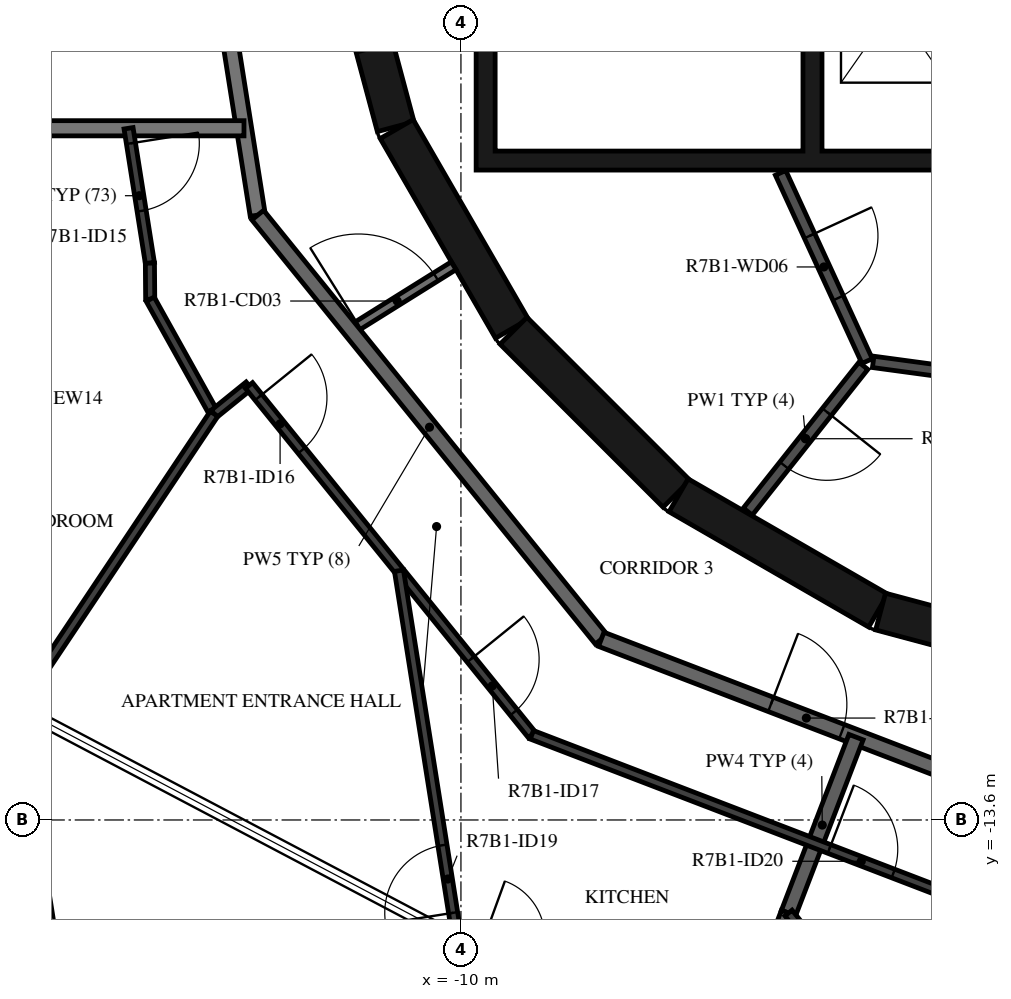
"""IFC4 building model, lengths in metres.
Left out: names, types, materials, properties, quantities, classifications, styles, units other than length and angle.
Written with IfcOpenShell. Run it as: python <this file> out.ifc"""

import sys

from ifc_helpers import new_model, si_unit, direction, frame, frame_2d, origin, place, context, subcontext, project, spatial, polyline, rectangle, outline, extrude, element, fill, save


model = new_model("IFC4")
c1 = context("Model", 3, precision=1e-05, world=origin(), true_north=direction((0.0, 1.0)))
c2 = subcontext(c1, "Body", "Model", "MODEL_VIEW")
j1 = project(units=[si_unit("LENGTHUNIT", "METRE"), si_unit("PLANEANGLEUNIT", "RADIAN")], contexts=[c1])
p1 = place(None, origin())
s1 = spatial("IfcSite", under=j1, at=p1, CompositionType="ELEMENT")
p2 = place(p1, origin())
s2 = spatial("IfcBuilding", under=s1, at=p2, CompositionType="ELEMENT")
p3 = place(p2, frame((0.0, 0.0, 273.9)))
s3 = spatial("IfcBuildingStorey", under=s2, at=p3, CompositionType="ELEMENT", Elevation=273.9)
p4 = place(p3, frame((-11.643, -1.55, 0.0), z_axis=(0.0, 0.0, 1.0), x_axis=(0.258734743916, -0.965948410781, 0.0)))
e1 = element("IfcWall", 1, at=p4, inside=s3, PredefinedType="SHEAR", context=c2, shape_type="SweptSolid", body=[
    extrude(rectangle(XDim=3.033, YDim=0.5, at=frame_2d((1.516, 0.0))), origin(), (0.0, 0.0, 1.0), 3.12),
])
p5 = place(p4, frame((1.066, 0.0, 0.0)))
e2 = element("IfcOpeningElement", 2, at=p5, cuts=e1, PredefinedType="OPENING", context=c2, shape_type="SweptSolid", body=[
    extrude(rectangle(XDim=0.9, YDim=2.1, at=frame_2d((0.45, 1.05))), frame((0.0, 0.26, 0.0), z_axis=(0.0, -1.0, 0.0), x_axis=(1.0, 0.0, 0.0)), (0.0, 0.0, 1.0), 0.52),
])
p6 = place(p3, frame((-10.845, -4.51, 0.0), z_axis=(0.0, 0.0, 1.0), x_axis=(0.500087131594, -0.865975092491, 0.0)))
e3 = element("IfcWall", 3, at=p6, inside=s3, PredefinedType="SHEAR", context=c2, shape_type="SweptSolid", body=[
    extrude(rectangle(XDim=3.033, YDim=0.5, at=frame_2d((1.516, 0.0))), origin(), (0.0, 0.0, 1.0), 3.12),
])
p7 = place(p3, frame((-9.308, -7.164, 0.0), z_axis=(0.0, 0.0, 1.0), x_axis=(0.707106781187, -0.707106781187, 0.0)))
e4 = element("IfcWall", 4, at=p7, inside=s3, PredefinedType="SHEAR", context=c2, shape_type="SweptSolid", body=[
    extrude(rectangle(XDim=3.032, YDim=0.5, at=frame_2d((1.516, 0.0))), origin(), (0.0, 0.0, 1.0), 3.12),
])
for number, where, z_axis, x_axis in (
    (5, (-7.137, -9.329, 0.0), (0.0, 0.0, 1.0), (0.866, -0.5, 0.0)),
    (6, (-4.479, -10.858, 0.0), (0.0, 0.0, 1.0), (0.966, -0.259, 0.0)),
):
    element("IfcWall", number, at=place(p3, frame(where, z_axis=z_axis, x_axis=x_axis)), inside=s3, PredefinedType="SHEAR", context=c2, shape_type="SweptSolid", body=[
        extrude(rectangle(XDim=3.033, YDim=0.5, at=frame_2d((1.516, 0.0))), origin(), (0.0, 0.0, 1.0), 3.12),
    ])
p8 = place(p3, origin())
e7 = element("IfcWall", 7, at=p8, inside=s3, PredefinedType="SHEAR", context=c2, shape_type="SweptSolid", body=[
    extrude(outline(polyline([(9.8, -5.05), (9.8, -4.8), (9.8, -1.9), (9.55, -1.9), (9.55, -4.8), (7.65, -4.8), (7.65, -1.9), (7.4, -1.9), (7.4, -4.8), (5.5, -4.8), (5.5, -1.9), (5.25, -1.9), (5.25, -4.8), (3.35, -4.8), (3.35, -1.9), (3.1, -1.9), (3.1, -4.8), (1.2, -4.8), (1.2, -1.9), (0.95, -1.9), (0.95, -4.8), (-0.95, -4.8), (-0.95, -1.9), (-1.2, -1.9), (-1.2, -4.8), (-3.1, -4.8), (-3.1, -1.9), (-3.35, -1.9), (-3.35, -4.8), (-5.25, -4.8), (-5.25, -1.9), (-5.5, -1.9), (-5.5, -4.8), (-9.55, -4.8), (-9.55, -1.9), (-9.8, -1.9), (-9.8, -4.8), (-9.8, -5.05), (9.8, -5.05)])), origin(), (0.0, 0.0, 1.0), 3.12),
])
p9 = place(p3, frame((-5.795, -5.086, 0.0), z_axis=(0.0, 0.0, 1.0), x_axis=(0.417887867606, -0.908498613157, 0.0)))
e8 = element("IfcWall", 8, at=p9, inside=s3, PredefinedType="PARTITIONING", context=c2, shape_type="SweptSolid", body=[
    extrude(rectangle(XDim=2.726, YDim=0.15, at=frame_2d((1.363, 0.0))), origin(), (0.0, 0.0, 1.0), 3.12),
])
p10 = place(p9, frame((0.913, 0.0, 0.0)))
e9 = element("IfcOpeningElement", 9, at=p10, cuts=e8, PredefinedType="OPENING", context=c2, shape_type="SweptSolid", body=[
    extrude(rectangle(XDim=0.9, YDim=2.1, at=frame_2d((0.45, 1.05))), frame((0.0, 0.085, 0.0), z_axis=(0.0, -1.0, 0.0), x_axis=(1.0, 0.0, 0.0)), (0.0, 0.0, 1.0), 0.17),
])
p11 = place(p3, frame((-4.706, -7.625, 0.0), z_axis=(0.0, 0.0, 1.0), x_axis=(-0.621392599334, -0.783499353856, 0.0)))
e10 = element("IfcWall", 10, at=p11, inside=s3, PredefinedType="PARTITIONING", context=c2, shape_type="SweptSolid", body=[
    extrude(rectangle(XDim=2.447, YDim=0.15, at=frame_2d((1.224, 0.0))), origin(), (0.0, 0.0, 1.0), 3.12),
])
p12 = place(p11, frame((0.774, 0.0, 0.0)))
e11 = element("IfcOpeningElement", 11, at=p12, cuts=e10, PredefinedType="OPENING", context=c2, shape_type="SweptSolid", body=[
    extrude(rectangle(XDim=0.9, YDim=2.1, at=frame_2d((0.45, 1.05))), frame((0.0, 0.085, 0.0), z_axis=(0.0, -1.0, 0.0), x_axis=(1.0, 0.0, 0.0)), (0.0, 0.0, 1.0), 0.17),
])
p13 = place(p3, frame((-2.42, -7.865, 0.0), z_axis=(0.0, 0.0, 1.0), x_axis=(-0.990972299108, 0.134066783362, 0.0)))
e12 = element("IfcWall", 12, at=p13, inside=s3, PredefinedType="PARTITIONING", context=c2, shape_type="SweptSolid", body=[
    extrude(rectangle(XDim=2.176, YDim=0.15, at=frame_2d((1.088, 0.0))), origin(), (0.0, 0.0, 1.0), 3.12),
])
p14 = place(p3, frame((-11.449, -7.154, 0.0), z_axis=(0.0, 0.0, 1.0), x_axis=(0.848067047543, 0.529888934468, 0.0)))
e13 = element("IfcWall", 13, at=p14, inside=s3, PredefinedType="PARTITIONING", context=c2, shape_type="SweptSolid", body=[
    extrude(rectangle(XDim=1.596, YDim=0.12, at=frame_2d((0.798, 0.0))), origin(), (0.0, 0.0, 1.0), 3.12),
])
p15 = place(p14, frame((0.12, 0.0, 0.0)))
e14 = element("IfcOpeningElement", 14, at=p15, cuts=e13, PredefinedType="OPENING", context=c2, shape_type="SweptSolid", body=[
    extrude(rectangle(XDim=1.2, YDim=2.1, at=frame_2d((0.6, 1.05))), frame((0.0, 0.07, 0.0), z_axis=(0.0, -1.0, 0.0), x_axis=(1.0, 0.0, 0.0)), (0.0, 0.0, 1.0), 0.14),
])
p16 = place(p3, frame((-13.797, 1.45, 0.0), z_axis=(0.0, 0.0, 1.0), x_axis=(0.156421704315, -0.987690361611, 0.0)))
e15 = element("IfcWall", 15, at=p16, inside=s3, PredefinedType="STANDARD", context=c2, shape_type="SweptSolid", body=[
    extrude(rectangle(XDim=7.181, YDim=0.2, at=frame_2d((3.591, 0.0))), origin(), (0.0, 0.0, 1.0), 3.12),
])
p17 = place(p3, frame((-12.673, -5.643, 0.0), z_axis=(0.0, 0.0, 1.0), x_axis=(0.629302871585, -0.777160148113, 0.0)))
e16 = element("IfcWall", 16, at=p17, inside=s3, PredefinedType="STANDARD", context=c2, shape_type="SweptSolid", body=[
    extrude(rectangle(XDim=7.181, YDim=0.2, at=frame_2d((3.59, 0.0))), origin(), (0.0, 0.0, 1.0), 3.12),
])
p18 = place(p3, frame((-8.154, -11.223, 0.0), z_axis=(0.0, 0.0, 1.0), x_axis=(0.93359073609, -0.358341090983, 0.0)))
e17 = element("IfcWall", 17, at=p18, inside=s3, PredefinedType="STANDARD", context=c2, shape_type="SweptSolid", body=[
    extrude(rectangle(XDim=7.181, YDim=0.2, at=frame_2d((3.59, 0.0))), origin(), (0.0, 0.0, 1.0), 3.12),
])
p19 = place(p18, frame((2.39, 0.0, 0.0)))
e18 = element("IfcOpeningElement", 18, at=p19, cuts=e17, PredefinedType="OPENING", context=c2, shape_type="SweptSolid", body=[
    extrude(rectangle(XDim=1.0, YDim=2.1, at=frame_2d((0.5, 1.05))), frame((0.0, 0.11, 0.0), z_axis=(0.0, -1.0, 0.0), x_axis=(1.0, 0.0, 0.0)), (0.0, 0.0, 1.0), 0.22),
])
p20 = place(p3, frame((-17.002, -4.5, 0.0), z_axis=(0.0, 0.0, 1.0), x_axis=(1.0, 0.0, 0.0)))
e19 = element("IfcWall", 19, at=p20, inside=s3, PredefinedType="STANDARD", context=c2, shape_type="SweptSolid", body=[
    extrude(rectangle(XDim=4.148, YDim=0.2, at=frame_2d((2.074, 0.0))), origin(), (0.0, 0.0, 1.0), 3.12),
])
p21 = place(p3, frame((-5.69, -14.824, 0.0), z_axis=(0.0, 0.0, 1.0), x_axis=(0.358345342952, 0.933589104041, 0.0)))
e20 = element("IfcWall", 20, at=p21, inside=s3, PredefinedType="STANDARD", context=c2, shape_type="SweptSolid", body=[
    extrude(rectangle(XDim=2.479, YDim=0.2, at=frame_2d((1.239, 0.0))), origin(), (0.0, 0.0, 1.0), 3.12),
])
p22 = place(p3, frame((-6.25, -16.282, 0.0), z_axis=(0.0, 0.0, 1.0), x_axis=(0.358360842469, 0.933583154617, 0.0)))
e21 = element("IfcWall", 21, at=p22, inside=s3, PredefinedType="STANDARD", context=c2, shape_type="SweptSolid", body=[
    extrude(rectangle(XDim=1.562, YDim=0.2, at=frame_2d((0.781, 0.0))), origin(), (0.0, 0.0, 1.0), 3.12),
])
p23 = place(p3, frame((-14.373, -4.5, 0.0), z_axis=(0.0, 0.0, 1.0), x_axis=(0.156437152886, -0.987687914878, 0.0)))
e22 = element("IfcWall", 22, at=p23, inside=s3, PredefinedType="PARTITIONING", context=c2, shape_type="SweptSolid", body=[
    extrude(rectangle(XDim=1.796, YDim=0.12, at=frame_2d((0.898, 0.0))), origin(), (0.0, 0.0, 1.0), 3.12),
])
p24 = place(p23, frame((0.2, 0.0, 0.0)))
e23 = element("IfcOpeningElement", 23, at=p24, cuts=e22, PredefinedType="OPENING", context=c2, shape_type="SweptSolid", body=[
    extrude(rectangle(XDim=0.9, YDim=2.1, at=frame_2d((0.45, 1.05))), frame((0.0, 0.07, 0.0), z_axis=(0.0, -1.0, 0.0), x_axis=(1.0, 0.0, 0.0)), (0.0, 0.0, 1.0), 0.14),
])
p25 = place(p3, frame((-14.092, -6.274, 0.0), z_axis=(0.0, 0.0, 1.0), x_axis=(0.008221715939, -0.999966201122, 0.0)))
e24 = element("IfcWall", 24, at=p25, inside=s3, PredefinedType="PARTITIONING", context=c2, shape_type="SweptSolid", body=[
    extrude(rectangle(XDim=0.475, YDim=0.12, at=frame_2d((0.238, 0.0))), origin(), (0.0, 0.0, 1.0), 3.12),
])
p26 = place(p3, frame((-14.088, -6.749, 0.0), z_axis=(0.0, 0.0, 1.0), x_axis=(0.486723752783, -0.873555944675, 0.0)))
e25 = element("IfcWall", 25, at=p26, inside=s3, PredefinedType="PARTITIONING", context=c2, shape_type="SweptSolid", body=[
    extrude(rectangle(XDim=1.726, YDim=0.12, at=frame_2d((0.863, 0.0))), origin(), (0.0, 0.0, 1.0), 3.12),
])
p27 = place(p3, frame((-13.248, -8.257, 0.0), z_axis=(0.0, 0.0, 1.0), x_axis=(0.777071947771, 0.629411779352, 0.0)))
e26 = element("IfcWall", 26, at=p27, inside=s3, PredefinedType="PARTITIONING", context=c2, shape_type="SweptSolid", body=[
    extrude(rectangle(XDim=0.592, YDim=0.12, at=frame_2d((0.296, 0.0))), origin(), (0.0, 0.0, 1.0), 3.12),
])
p28 = place(p3, frame((-12.788, -7.884, 0.0), z_axis=(0.0, 0.0, 1.0), x_axis=(0.6293312414, -0.777137174891, 0.0)))
e27 = element("IfcWall", 27, at=p28, inside=s3, PredefinedType="PARTITIONING", context=c2, shape_type="SweptSolid", body=[
    extrude(rectangle(XDim=5.913, YDim=0.12, at=frame_2d((2.957, 0.0))), origin(), (0.0, 0.0, 1.0), 3.12),
])
p29 = place(p28, frame((0.2, 0.0, 0.0)))
e28 = element("IfcOpeningElement", 28, at=p29, cuts=e27, PredefinedType="OPENING", context=c2, shape_type="SweptSolid", body=[
    extrude(rectangle(XDim=0.9, YDim=2.1, at=frame_2d((0.45, 1.05))), frame((0.0, 0.07, 0.0), z_axis=(0.0, -1.0, 0.0), x_axis=(1.0, 0.0, 0.0)), (0.0, 0.0, 1.0), 0.14),
])
p30 = place(p28, frame((4.635, 0.0, 0.0)))
e29 = element("IfcOpeningElement", 29, at=p30, cuts=e27, PredefinedType="OPENING", context=c2, shape_type="SweptSolid", body=[
    extrude(rectangle(XDim=0.9, YDim=2.1, at=frame_2d((0.45, 1.05))), frame((0.0, 0.07, 0.0), z_axis=(0.0, -1.0, 0.0), x_axis=(1.0, 0.0, 0.0)), (0.0, 0.0, 1.0), 0.14),
])
p31 = place(p3, frame((-9.067, -12.479, 0.0), z_axis=(0.0, 0.0, 1.0), x_axis=(0.933579449035, -0.358370495911, 0.0)))
e30 = element("IfcWall", 30, at=p31, inside=s3, PredefinedType="PARTITIONING", context=c2, shape_type="SweptSolid", body=[
    extrude(rectangle(XDim=7.985, YDim=0.12, at=frame_2d((3.992, 0.0))), origin(), (0.0, 0.0, 1.0), 3.12),
])
p32 = place(p31, frame((4.192, 0.0, 0.0)))
e31 = element("IfcOpeningElement", 31, at=p32, cuts=e30, PredefinedType="OPENING", context=c2, shape_type="SweptSolid", body=[
    extrude(rectangle(XDim=0.9, YDim=2.1, at=frame_2d((0.45, 1.05))), frame((0.0, 0.07, 0.0), z_axis=(0.0, -1.0, 0.0), x_axis=(1.0, 0.0, 0.0)), (0.0, 0.0, 1.0), 0.14),
])
p33 = place(p3, frame((-15.802, -12.08, 0.0), z_axis=(0.0, 0.0, 1.0), x_axis=(0.555386305099, 0.831592479589, 0.0)))
e32 = element("IfcWall", 32, at=p33, inside=s3, PredefinedType="PARTITIONING", context=c2, shape_type="SweptSolid", body=[
    extrude(rectangle(XDim=4.597, YDim=0.12, at=frame_2d((2.299, 0.0))), origin(), (0.0, 0.0, 1.0), 3.12),
])
p34 = place(p3, frame((-9.619, -17.871, 0.0), z_axis=(0.0, 0.0, 1.0), x_axis=(-0.156433255633, 0.987688532146, 0.0)))
e33 = element("IfcWall", 33, at=p34, inside=s3, PredefinedType="PARTITIONING", context=c2, shape_type="SweptSolid", body=[
    extrude(rectangle(XDim=7.644, YDim=0.12, at=frame_2d((3.822, 0.0))), origin(), (0.0, 0.0, 1.0), 3.12),
])
p35 = place(p34, frame((3.087, 0.0, 0.0)))
e34 = element("IfcOpeningElement", 34, at=p35, cuts=e33, PredefinedType="OPENING", context=c2, shape_type="SweptSolid", body=[
    extrude(rectangle(XDim=0.9, YDim=2.1, at=frame_2d((0.45, 1.05))), frame((0.0, 0.07, 0.0), z_axis=(0.0, -1.0, 0.0), x_axis=(1.0, 0.0, 0.0)), (0.0, 0.0, 1.0), 0.14),
])
p36 = place(p3, frame((-4.809, -19.717, 0.0), z_axis=(0.0, 0.0, 1.0), x_axis=(0.777140730041, 0.629326851255, 0.0)))
e35 = element("IfcWall", 35, at=p36, inside=s3, PredefinedType="PARTITIONING", context=c2, shape_type="SweptSolid", body=[
    extrude(rectangle(XDim=7.644, YDim=0.12, at=frame_2d((3.822, 0.0))), origin(), (0.0, 0.0, 1.0), 3.12),
])
p37 = place(p36, frame((2.594, 0.0, 0.0)))
e36 = element("IfcOpeningElement", 36, at=p37, cuts=e35, PredefinedType="OPENING", context=c2, shape_type="SweptSolid", body=[
    extrude(rectangle(XDim=0.9, YDim=2.1, at=frame_2d((0.45, 1.05))), frame((0.0, 0.07, 0.0), z_axis=(0.0, -1.0, 0.0), x_axis=(1.0, 0.0, 0.0)), (0.0, 0.0, 1.0), 0.14),
])
p38 = place(p36, frame((0.3, 0.0, 0.0)))
e37 = element("IfcOpeningElement", 37, at=p38, cuts=e35, PredefinedType="OPENING", context=c2, shape_type="SweptSolid", body=[
    extrude(rectangle(XDim=0.8, YDim=2.1, at=frame_2d((0.4, 1.05))), frame((0.0, 0.07, 0.0), z_axis=(0.0, -1.0, 0.0), x_axis=(1.0, 0.0, 0.0)), (0.0, 0.0, 1.0), 0.14),
])
p39 = place(p36, frame((4.319, 0.0, 0.0)))
e38 = element("IfcOpeningElement", 38, at=p39, cuts=e35, PredefinedType="OPENING", context=c2, shape_type="SweptSolid", body=[
    extrude(rectangle(XDim=0.9, YDim=2.1, at=frame_2d((0.45, 1.05))), frame((0.0, 0.07, 0.0), z_axis=(0.0, -1.0, 0.0), x_axis=(1.0, 0.0, 0.0)), (0.0, 0.0, 1.0), 0.14),
])
p40 = place(p3, frame((-2.948, -18.21, 0.0), z_axis=(0.0, 0.0, 1.0), x_axis=(-0.629330389268, 0.777137864953, 0.0)))
e39 = element("IfcWall", 39, at=p40, inside=s3, PredefinedType="PARTITIONING", context=c2, shape_type="SweptSolid", body=[
    extrude(rectangle(XDim=4.357, YDim=0.12, at=frame_2d((2.179, 0.0))), origin(), (0.0, 0.0, 1.0), 3.12),
])
p41 = place(p10, origin())
e40 = element("IfcDoor", 40, at=p41, inside=s3, OperationType="SINGLE_SWING_RIGHT", PredefinedType="DOOR", context=c2, shape_type="SweptSolid", body=[
    extrude(rectangle(XDim=0.9, YDim=2.1, at=frame_2d((0.45, 1.05))), frame((0.0, 0.025, 0.0), z_axis=(0.0, -1.0, 0.0), x_axis=(1.0, 0.0, 0.0)), (0.0, 0.0, 1.0), 0.05),
])
fill(e9, e40)
p42 = place(p12, origin())
e41 = element("IfcDoor", 41, at=p42, inside=s3, OperationType="SINGLE_SWING_LEFT", PredefinedType="DOOR", context=c2, shape_type="SweptSolid", body=[
    extrude(rectangle(XDim=0.9, YDim=2.1, at=frame_2d((0.45, 1.05))), frame((0.0, 0.025, 0.0), z_axis=(0.0, -1.0, 0.0), x_axis=(1.0, 0.0, 0.0)), (0.0, 0.0, 1.0), 0.05),
])
fill(e11, e41)
p43 = place(p19, origin())
e42 = element("IfcDoor", 42, at=p43, inside=s3, OperationType="SINGLE_SWING_RIGHT", PredefinedType="DOOR", context=c2, shape_type="SweptSolid", body=[
    extrude(rectangle(XDim=1.0, YDim=2.1, at=frame_2d((0.5, 1.05))), frame((0.0, 0.025, 0.0), z_axis=(0.0, -1.0, 0.0), x_axis=(1.0, 0.0, 0.0)), (0.0, 0.0, 1.0), 0.05),
])
fill(e18, e42)
p44 = place(p24, origin())
e43 = element("IfcDoor", 43, at=p44, inside=s3, OperationType="SINGLE_SWING_RIGHT", PredefinedType="DOOR", context=c2, shape_type="SweptSolid", body=[
    extrude(rectangle(XDim=0.9, YDim=2.1, at=frame_2d((0.45, 1.05))), frame((0.0, 0.025, 0.0), z_axis=(0.0, -1.0, 0.0), x_axis=(1.0, 0.0, 0.0)), (0.0, 0.0, 1.0), 0.05),
])
fill(e23, e43)
p45 = place(p29, origin())
e44 = element("IfcDoor", 44, at=p45, inside=s3, OperationType="SINGLE_SWING_RIGHT", PredefinedType="DOOR", context=c2, shape_type="SweptSolid", body=[
    extrude(rectangle(XDim=0.9, YDim=2.1, at=frame_2d((0.45, 1.05))), frame((0.0, 0.025, 0.0), z_axis=(0.0, -1.0, 0.0), x_axis=(1.0, 0.0, 0.0)), (0.0, 0.0, 1.0), 0.05),
])
fill(e28, e44)
p46 = place(p30, origin())
e45 = element("IfcDoor", 45, at=p46, inside=s3, OperationType="SINGLE_SWING_RIGHT", PredefinedType="DOOR", context=c2, shape_type="SweptSolid", body=[
    extrude(rectangle(XDim=0.9, YDim=2.1, at=frame_2d((0.45, 1.05))), frame((0.0, 0.025, 0.0), z_axis=(0.0, -1.0, 0.0), x_axis=(1.0, 0.0, 0.0)), (0.0, 0.0, 1.0), 0.05),
])
fill(e29, e45)
p47 = place(p35, origin())
e46 = element("IfcDoor", 46, at=p47, inside=s3, OperationType="SINGLE_SWING_LEFT", PredefinedType="DOOR", context=c2, shape_type="SweptSolid", body=[
    extrude(rectangle(XDim=0.9, YDim=2.1, at=frame_2d((0.45, 1.05))), frame((0.0, 0.025, 0.0), z_axis=(0.0, -1.0, 0.0), x_axis=(1.0, 0.0, 0.0)), (0.0, 0.0, 1.0), 0.05),
])
fill(e34, e46)
p48 = place(p32, origin())
e47 = element("IfcDoor", 47, at=p48, inside=s3, OperationType="SINGLE_SWING_RIGHT", PredefinedType="DOOR", context=c2, shape_type="SweptSolid", body=[
    extrude(rectangle(XDim=0.9, YDim=2.1, at=frame_2d((0.45, 1.05))), frame((0.0, 0.025, 0.0), z_axis=(0.0, -1.0, 0.0), x_axis=(1.0, 0.0, 0.0)), (0.0, 0.0, 1.0), 0.05),
])
fill(e31, e47)
p49 = place(p15, origin())
e48 = element("IfcDoor", 48, at=p49, inside=s3, OperationType="DOUBLE_DOOR_SINGLE_SWING", PredefinedType="DOOR", context=c2, shape_type="SweptSolid", body=[
    extrude(rectangle(XDim=1.2, YDim=2.1, at=frame_2d((0.6, 1.05))), frame((0.0, 0.025, 0.0), z_axis=(0.0, -1.0, 0.0), x_axis=(1.0, 0.0, 0.0)), (0.0, 0.0, 1.0), 0.05),
])
fill(e14, e48)
save(model, sys.argv[1])
